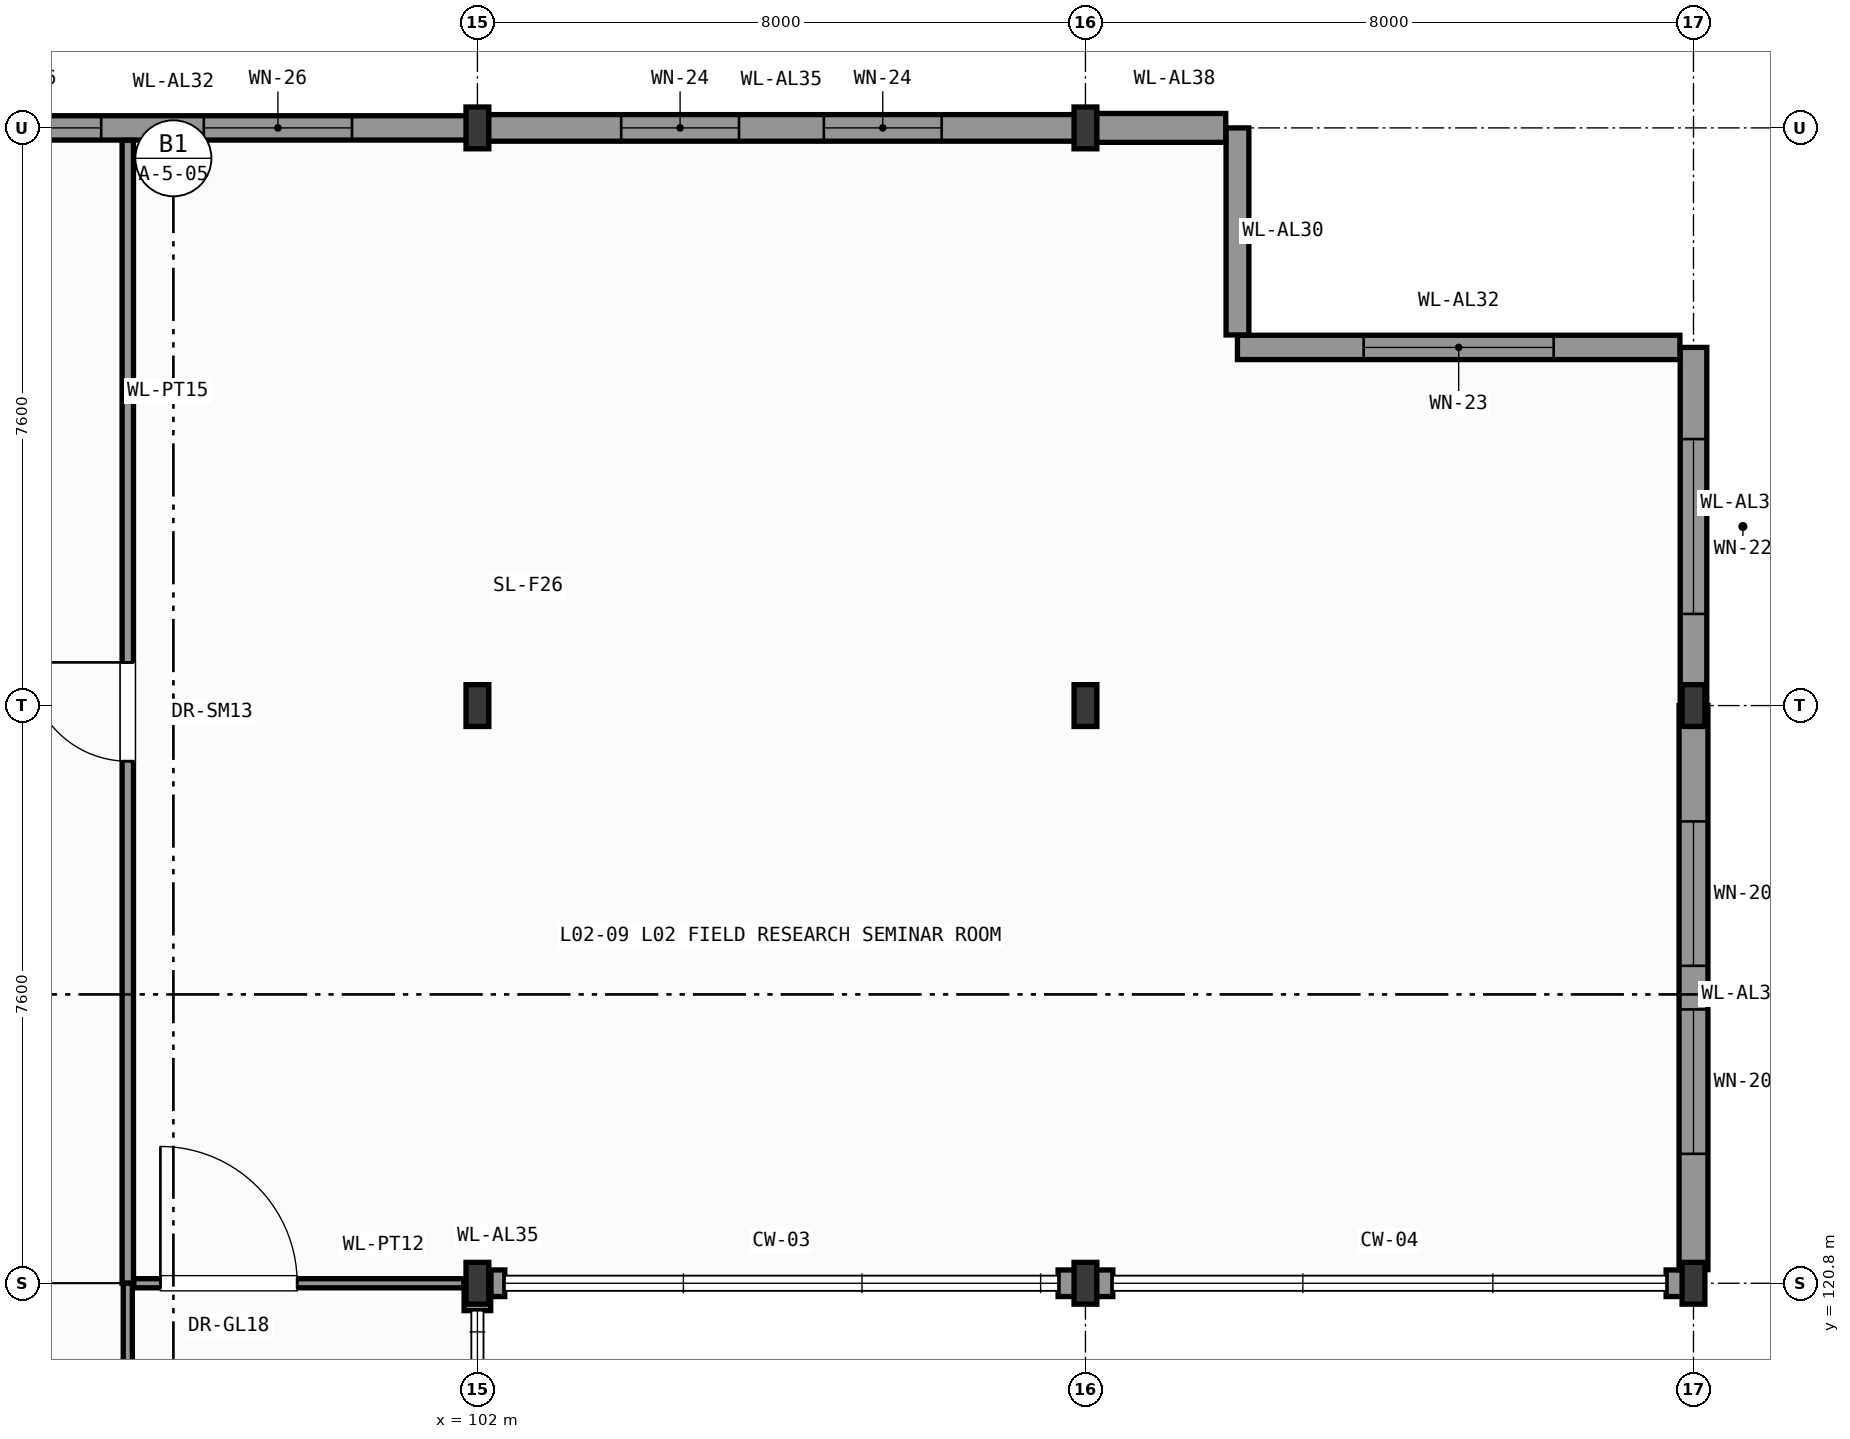
"""IFC4 building model, lengths in metres.
Left out: names, types, materials, properties, quantities, classifications, styles, units other than length and angle.
Written with IfcOpenShell. Run it as: python <this file> out.ifc"""

import sys

from ifc_helpers import new_model, si_unit, direction, frame, frame_2d, origin, origin_2d, place, context, subcontext, project, spatial, rectangle, i_section, extrude, element, fill, save


model = new_model("IFC4")
c1 = context("Model", 3, precision=1e-05, world=origin(), true_north=direction((0.0, 1.0)))
c2 = subcontext(c1, "Body", "Model", "MODEL_VIEW")
j1 = project(units=[si_unit("LENGTHUNIT", "METRE"), si_unit("PLANEANGLEUNIT", "RADIAN")], contexts=[c1])
p1 = place(None, origin())
s1 = spatial("IfcSite", under=j1, at=p1, CompositionType="ELEMENT")
p2 = place(p1, origin())
s2 = spatial("IfcBuilding", under=s1, at=p2, CompositionType="ELEMENT")
p3 = place(p2, frame((0.0, 0.0, 7.8)))
s3 = spatial("IfcBuildingStorey", under=s2, at=p3, CompositionType="ELEMENT", Elevation=7.8)
for number, where, z_axis, x_axis in (
    (1, (102.0, 120.8, 0.0), (0.0, 0.0, 1.0), (1.0, 0.0, 0.0)),
    (2, (102.0, 128.4, 0.0), (0.0, 0.0, 1.0), (1.0, 0.0, 0.0)),
    (3, (102.0, 136.0, 0.0), (0.0, 0.0, 1.0), (1.0, 0.0, 0.0)),
    (4, (110.0, 120.8, 0.0), (0.0, 0.0, 1.0), (1.0, 0.0, 0.0)),
    (5, (110.0, 128.4, 0.0), (0.0, 0.0, 1.0), (1.0, 0.0, 0.0)),
    (6, (110.0, 136.0, 0.0), (0.0, 0.0, 1.0), (1.0, 0.0, 0.0)),
    (7, (118.0, 120.8, 0.0), (0.0, 0.0, 1.0), (1.0, 0.0, 0.0)),
    (8, (118.0, 128.4, 0.0), (0.0, 0.0, 1.0), (1.0, 0.0, 0.0)),
):
    element("IfcColumn", number, at=place(p3, frame(where, z_axis=z_axis, x_axis=x_axis)), inside=s3, PredefinedType="COLUMN", context=c2, shape_type="SweptSolid", body=[
        extrude(i_section(OverallWidth=0.3, OverallDepth=0.55, WebThickness=0.015, FlangeThickness=0.029, FilletRadius=0.027, at=origin_2d()), origin(), (0.0, 0.0, 1.0), 5.4),
    ])
p4 = place(p3, frame((102.0, 120.44, 0.0), z_axis=(0.0, 0.0, 1.0), x_axis=(0.0, 1.0, 0.0)))
e9 = element("IfcWall", 9, at=p4, inside=s3, PredefinedType="SOLIDWALL", context=c2, shape_type="SweptSolid", body=[
    extrude(rectangle(XDim=0.36, YDim=0.35, at=frame_2d((0.18, 0.0))), origin(), (0.0, 0.0, 1.0), 4.685),
])
p5 = place(p3, frame((102.179, 120.8, 0.0), z_axis=(0.0, 0.0, 1.0), x_axis=(1.0, 0.0, 0.0)))
e10 = element("IfcWall", 10, at=p5, inside=s3, PredefinedType="SOLIDWALL", context=c2, shape_type="SweptSolid", body=[
    extrude(rectangle(XDim=0.181, YDim=0.35, at=frame_2d((0.091, 0.0))), origin(), (0.0, 0.0, 1.0), 5.15),
])
for number, where, z_axis, x_axis in (
    (11, (109.64, 120.8, 0.0), (0.0, 0.0, 1.0), (1.0, 0.0, 0.0)),
    (12, (110.0, 120.8, 0.0), (0.0, 0.0, 1.0), (1.0, 0.0, 0.0)),
    (13, (117.64, 120.8, 0.0), (0.0, 0.0, 1.0), (1.0, 0.0, 0.0)),
):
    element("IfcWall", number, at=place(p3, frame(where, z_axis=z_axis, x_axis=x_axis)), inside=s3, PredefinedType="SOLIDWALL", context=c2, shape_type="SweptSolid", body=[
        extrude(rectangle(XDim=0.36, YDim=0.35, at=frame_2d((0.18, 0.0))), origin(), (0.0, 0.0, 1.0), 4.785),
    ])
p6 = place(p3, frame((118.0, 128.4, 0.0), z_axis=(0.0, 0.0, 1.0), x_axis=(0.0, -1.0, 0.0)))
e14 = element("IfcWall", 14, at=p6, inside=s3, PredefinedType="SOLIDWALL", context=c2, shape_type="SweptSolid", body=[
    extrude(rectangle(XDim=7.421, YDim=0.38, at=frame_2d((3.71, 0.0))), origin(), (0.0, 0.0, 1.0), 4.685),
])
p7 = place(p6, frame((1.524, 0.0, 0.95)))
e15 = element("IfcOpeningElement", 15, at=p7, cuts=e14, PredefinedType="OPENING", context=c2, shape_type="SweptSolid", body=[
    extrude(rectangle(XDim=1.9, YDim=2.9, at=frame_2d((0.95, 1.45))), frame((0.0, 0.2, 0.0), z_axis=(0.0, -1.0, 0.0), x_axis=(1.0, 0.0, 0.0)), (0.0, 0.0, 1.0), 0.4),
])
p8 = place(p6, frame((3.997, 0.0, 0.95)))
e16 = element("IfcOpeningElement", 16, at=p8, cuts=e14, PredefinedType="OPENING", context=c2, shape_type="SweptSolid", body=[
    extrude(rectangle(XDim=1.9, YDim=2.9, at=frame_2d((0.95, 1.45))), frame((0.0, 0.2, 0.0), z_axis=(0.0, -1.0, 0.0), x_axis=(1.0, 0.0, 0.0)), (0.0, 0.0, 1.0), 0.4),
])
p9 = place(p3, frame((118.0, 133.112, 0.0), z_axis=(0.0, 0.0, 1.0), x_axis=(0.0, -1.0, 0.0)))
e17 = element("IfcWall", 17, at=p9, inside=s3, PredefinedType="SOLIDWALL", context=c2, shape_type="SweptSolid", body=[
    extrude(rectangle(XDim=4.712, YDim=0.35, at=frame_2d((2.356, 0.0))), origin(), (0.0, 0.0, 1.0), 5.15),
])
p10 = place(p9, frame((1.206, 0.0, 0.95)))
e18 = element("IfcOpeningElement", 18, at=p10, cuts=e17, PredefinedType="OPENING", context=c2, shape_type="SweptSolid", body=[
    extrude(rectangle(XDim=2.3, YDim=3.3, at=frame_2d((1.15, 1.65))), frame((0.0, 0.185, 0.0), z_axis=(0.0, -1.0, 0.0), x_axis=(1.0, 0.0, 0.0)), (0.0, 0.0, 1.0), 0.37),
])
p11 = place(p3, frame((112.0, 133.112, 0.0), z_axis=(0.0, 0.0, 1.0), x_axis=(1.0, 0.0, 0.0)))
e19 = element("IfcWall", 19, at=p11, inside=s3, PredefinedType="SOLIDWALL", context=c2, shape_type="SweptSolid", body=[
    extrude(rectangle(XDim=5.821, YDim=0.32, at=frame_2d((2.911, 0.0))), origin(), (0.0, 0.0, 1.0), 5.15),
])
p12 = place(p11, frame((1.66, 0.0, 0.95)))
e20 = element("IfcOpeningElement", 20, at=p12, cuts=e19, PredefinedType="OPENING", context=c2, shape_type="SweptSolid", body=[
    extrude(rectangle(XDim=2.5, YDim=3.5, at=frame_2d((1.25, 1.75))), frame((0.0, 0.17, 0.0), z_axis=(0.0, -1.0, 0.0), x_axis=(1.0, 0.0, 0.0)), (0.0, 0.0, 1.0), 0.34),
])
p13 = place(p3, frame((112.0, 136.0, 0.0), z_axis=(0.0, 0.0, 1.0), x_axis=(0.0, -1.0, 0.0)))
e21 = element("IfcWall", 21, at=p13, inside=s3, PredefinedType="SOLIDWALL", context=c2, shape_type="SweptSolid", body=[
    extrude(rectangle(XDim=2.724, YDim=0.3, at=frame_2d((1.362, 0.0))), origin(), (0.0, 0.0, 1.0), 5.15),
])
p14 = place(p3, frame((110.0, 136.0, 0.0), z_axis=(0.0, 0.0, 1.0), x_axis=(1.0, 0.0, 0.0)))
e22 = element("IfcWall", 22, at=p14, inside=s3, PredefinedType="SOLIDWALL", context=c2, shape_type="SweptSolid", body=[
    extrude(rectangle(XDim=1.846, YDim=0.38, at=frame_2d((0.923, 0.0))), origin(), (0.0, 0.0, 1.0), 5.15),
])
p15 = place(p3, frame((102.0, 136.0, 0.0), z_axis=(0.0, 0.0, 1.0), x_axis=(1.0, 0.0, 0.0)))
e23 = element("IfcWall", 23, at=p15, inside=s3, PredefinedType="SOLIDWALL", context=c2, shape_type="SweptSolid", body=[
    extrude(rectangle(XDim=8.0, YDim=0.35, at=frame_2d((4.0, 0.0))), origin(), (0.0, 0.0, 1.0), 4.795),
])
p16 = place(p15, frame((1.892, 0.0, 0.95)))
e24 = element("IfcOpeningElement", 24, at=p16, cuts=e23, PredefinedType="OPENING", context=c2, shape_type="SweptSolid", body=[
    extrude(rectangle(XDim=1.55, YDim=2.1, at=frame_2d((0.775, 1.05))), frame((0.0, 0.185, 0.0), z_axis=(0.0, -1.0, 0.0), x_axis=(1.0, 0.0, 0.0)), (0.0, 0.0, 1.0), 0.37),
])
p17 = place(p15, frame((4.558, 0.0, 0.95)))
e25 = element("IfcOpeningElement", 25, at=p17, cuts=e23, PredefinedType="OPENING", context=c2, shape_type="SweptSolid", body=[
    extrude(rectangle(XDim=1.55, YDim=2.1, at=frame_2d((0.775, 1.05))), frame((0.0, 0.185, 0.0), z_axis=(0.0, -1.0, 0.0), x_axis=(1.0, 0.0, 0.0)), (0.0, 0.0, 1.0), 0.37),
])
p18 = place(p3, frame((94.0, 136.0, 0.0), z_axis=(0.0, 0.0, 1.0), x_axis=(1.0, 0.0, 0.0)))
e26 = element("IfcWall", 26, at=p18, inside=s3, PredefinedType="SOLIDWALL", context=c2, shape_type="SweptSolid", body=[
    extrude(rectangle(XDim=8.0, YDim=0.32, at=frame_2d((4.0, 0.0))), origin(), (0.0, 0.0, 1.0), 4.795),
])
p19 = place(p18, frame((1.1, 0.0, 0.95)))
e27 = element("IfcOpeningElement", 27, at=p19, cuts=e26, PredefinedType="OPENING", context=c2, shape_type="SweptSolid", body=[
    extrude(rectangle(XDim=1.95, YDim=2.55, at=frame_2d((0.975, 1.275))), frame((0.0, 0.17, 0.0), z_axis=(0.0, -1.0, 0.0), x_axis=(1.0, 0.0, 0.0)), (0.0, 0.0, 1.0), 0.34),
])
p20 = place(p18, frame((4.4, 0.0, 0.95)))
e28 = element("IfcOpeningElement", 28, at=p20, cuts=e26, PredefinedType="OPENING", context=c2, shape_type="SweptSolid", body=[
    extrude(rectangle(XDim=1.95, YDim=2.55, at=frame_2d((0.975, 1.275))), frame((0.0, 0.17, 0.0), z_axis=(0.0, -1.0, 0.0), x_axis=(1.0, 0.0, 0.0)), (0.0, 0.0, 1.0), 0.34),
])
p21 = place(p3, frame((97.4, 120.8, 0.0), z_axis=(0.0, 0.0, 1.0), x_axis=(0.0, 1.0, 0.0)))
e29 = element("IfcWall", 29, at=p21, inside=s3, PredefinedType="PARTITIONING", context=c2, shape_type="SweptSolid", body=[
    extrude(rectangle(XDim=15.036, YDim=0.15, at=frame_2d((7.518, 0.0))), origin(), (0.0, 0.0, 1.0), 5.15),
])
p22 = place(p21, frame((6.868, 0.0, 0.0)))
e30 = element("IfcOpeningElement", 30, at=p22, cuts=e29, PredefinedType="OPENING", context=c2, shape_type="SweptSolid", body=[
    extrude(rectangle(XDim=1.3, YDim=2.25, at=frame_2d((0.65, 1.125))), frame((0.0, 0.085, 0.0), z_axis=(0.0, -1.0, 0.0), x_axis=(1.0, 0.0, 0.0)), (0.0, 0.0, 1.0), 0.17),
])
p23 = place(p3, frame((97.479, 120.8, 0.0), z_axis=(0.0, 0.0, 1.0), x_axis=(1.0, 0.0, 0.0)))
e31 = element("IfcWall", 31, at=p23, inside=s3, PredefinedType="PARTITIONING", context=c2, shape_type="SweptSolid", body=[
    extrude(rectangle(XDim=4.342, YDim=0.12, at=frame_2d((2.171, 0.0))), origin(), (0.0, 0.0, 1.0), 4.865),
])
p24 = place(p23, frame((0.35, 0.0, 0.0)))
e32 = element("IfcOpeningElement", 32, at=p24, cuts=e31, PredefinedType="OPENING", context=c2, shape_type="SweptSolid", body=[
    extrude(rectangle(XDim=1.8, YDim=2.4, at=frame_2d((0.9, 1.2))), frame((0.0, 0.07, 0.0), z_axis=(0.0, -1.0, 0.0), x_axis=(1.0, 0.0, 0.0)), (0.0, 0.0, 1.0), 0.14),
])
p25 = place(p3, frame((97.4, 90.4, 0.0), z_axis=(0.0, 0.0, 1.0), x_axis=(0.0, 1.0, 0.0)))
e33 = element("IfcWall", 33, at=p25, inside=s3, PredefinedType="PARTITIONING", context=c2, shape_type="SweptSolid", body=[
    extrude(rectangle(XDim=30.4, YDim=0.12, at=frame_2d((15.2, 0.0))), origin(), (0.0, 0.0, 1.0), 5.15),
])
p26 = place(p25, frame((14.1, 0.0, 0.0)))
e34 = element("IfcOpeningElement", 34, at=p26, cuts=e33, PredefinedType="OPENING", context=c2, shape_type="SweptSolid", body=[
    extrude(rectangle(XDim=2.2, YDim=2.6, at=frame_2d((1.1, 1.3))), frame((0.0, 0.07, 0.0), z_axis=(0.0, -1.0, 0.0), x_axis=(1.0, 0.0, 0.0)), (0.0, 0.0, 1.0), 0.14),
])
p27 = place(p7, origin())
e35 = element("IfcWindow", 35, at=p27, inside=s3, PartitioningType="SINGLE_PANEL", PredefinedType="WINDOW", context=c2, shape_type="SweptSolid", body=[
    extrude(rectangle(XDim=1.9, YDim=2.9, at=frame_2d((0.95, 1.45))), frame((0.0, 0.03, 0.0), z_axis=(0.0, -1.0, 0.0), x_axis=(1.0, 0.0, 0.0)), (0.0, 0.0, 1.0), 0.06),
])
fill(e15, e35)
p28 = place(p8, origin())
e36 = element("IfcWindow", 36, at=p28, inside=s3, PartitioningType="SINGLE_PANEL", PredefinedType="WINDOW", context=c2, shape_type="SweptSolid", body=[
    extrude(rectangle(XDim=1.9, YDim=2.9, at=frame_2d((0.95, 1.45))), frame((0.0, 0.03, 0.0), z_axis=(0.0, -1.0, 0.0), x_axis=(1.0, 0.0, 0.0)), (0.0, 0.0, 1.0), 0.06),
])
fill(e16, e36)
p29 = place(p10, origin())
e37 = element("IfcWindow", 37, at=p29, inside=s3, PartitioningType="SINGLE_PANEL", PredefinedType="WINDOW", context=c2, shape_type="SweptSolid", body=[
    extrude(rectangle(XDim=2.3, YDim=3.3, at=frame_2d((1.15, 1.65))), frame((0.0, 0.03, 0.0), z_axis=(0.0, -1.0, 0.0), x_axis=(1.0, 0.0, 0.0)), (0.0, 0.0, 1.0), 0.06),
])
fill(e18, e37)
p30 = place(p12, origin())
e38 = element("IfcWindow", 38, at=p30, inside=s3, PartitioningType="SINGLE_PANEL", PredefinedType="WINDOW", context=c2, shape_type="SweptSolid", body=[
    extrude(rectangle(XDim=2.5, YDim=3.5, at=frame_2d((1.25, 1.75))), frame((0.0, 0.03, 0.0), z_axis=(0.0, -1.0, 0.0), x_axis=(1.0, 0.0, 0.0)), (0.0, 0.0, 1.0), 0.06),
])
fill(e20, e38)
p31 = place(p16, origin())
e39 = element("IfcWindow", 39, at=p31, inside=s3, PartitioningType="SINGLE_PANEL", PredefinedType="WINDOW", context=c2, shape_type="SweptSolid", body=[
    extrude(rectangle(XDim=1.55, YDim=2.1, at=frame_2d((0.775, 1.05))), frame((0.0, 0.03, 0.0), z_axis=(0.0, -1.0, 0.0), x_axis=(1.0, 0.0, 0.0)), (0.0, 0.0, 1.0), 0.06),
])
fill(e24, e39)
p32 = place(p17, origin())
e40 = element("IfcWindow", 40, at=p32, inside=s3, PartitioningType="SINGLE_PANEL", PredefinedType="WINDOW", context=c2, shape_type="SweptSolid", body=[
    extrude(rectangle(XDim=1.55, YDim=2.1, at=frame_2d((0.775, 1.05))), frame((0.0, 0.03, 0.0), z_axis=(0.0, -1.0, 0.0), x_axis=(1.0, 0.0, 0.0)), (0.0, 0.0, 1.0), 0.06),
])
fill(e25, e40)
p33 = place(p19, origin())
e41 = element("IfcWindow", 41, at=p33, inside=s3, PartitioningType="SINGLE_PANEL", PredefinedType="WINDOW", context=c2, shape_type="SweptSolid", body=[
    extrude(rectangle(XDim=1.95, YDim=2.55, at=frame_2d((0.975, 1.275))), frame((0.0, 0.03, 0.0), z_axis=(0.0, -1.0, 0.0), x_axis=(1.0, 0.0, 0.0)), (0.0, 0.0, 1.0), 0.06),
])
fill(e27, e41)
p34 = place(p20, origin())
e42 = element("IfcWindow", 42, at=p34, inside=s3, PartitioningType="SINGLE_PANEL", PredefinedType="WINDOW", context=c2, shape_type="SweptSolid", body=[
    extrude(rectangle(XDim=1.95, YDim=2.55, at=frame_2d((0.975, 1.275))), frame((0.0, 0.03, 0.0), z_axis=(0.0, -1.0, 0.0), x_axis=(1.0, 0.0, 0.0)), (0.0, 0.0, 1.0), 0.06),
])
fill(e28, e42)
p35 = place(p22, origin())
e43 = element("IfcDoor", 43, at=p35, inside=s3, OperationType="SINGLE_SWING_RIGHT", PredefinedType="DOOR", context=c2, shape_type="SweptSolid", body=[
    extrude(rectangle(XDim=1.3, YDim=2.25, at=frame_2d((0.65, 1.125))), frame((0.0, 0.025, 0.0), z_axis=(0.0, -1.0, 0.0), x_axis=(1.0, 0.0, 0.0)), (0.0, 0.0, 1.0), 0.05),
])
fill(e30, e43)
p36 = place(p24, origin())
e44 = element("IfcDoor", 44, at=p36, inside=s3, OperationType="SINGLE_SWING_LEFT", PredefinedType="DOOR", context=c2, shape_type="SweptSolid", body=[
    extrude(rectangle(XDim=1.8, YDim=2.4, at=frame_2d((0.9, 1.2))), frame((0.0, 0.025, 0.0), z_axis=(0.0, -1.0, 0.0), x_axis=(1.0, 0.0, 0.0)), (0.0, 0.0, 1.0), 0.05),
])
fill(e32, e44)
save(model, sys.argv[1])
